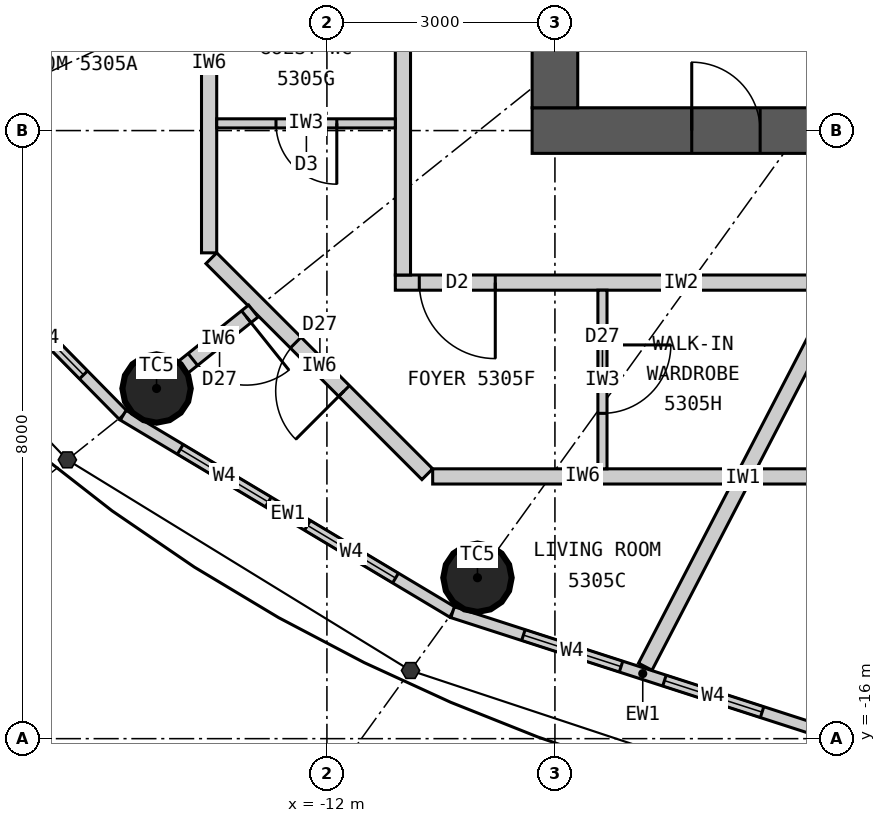
"""IFC4 building model, lengths in metres.
Left out: names, types, materials, properties, quantities, classifications, styles, units other than length and angle.
Written with IfcOpenShell. Run it as: python <this file> out.ifc"""

import sys

from ifc_helpers import new_model, si_unit, direction, frame, frame_2d, origin, origin_2d, place, context, subcontext, project, spatial, rectangle, circle, extrude, element, fill, save


model = new_model("IFC4")
c1 = context("Model", 3, precision=1e-05, world=origin(), true_north=direction((0.0, 1.0)))
c2 = subcontext(c1, "Body", "Model", "MODEL_VIEW")
j1 = project(units=[si_unit("LENGTHUNIT", "METRE"), si_unit("PLANEANGLEUNIT", "RADIAN")], contexts=[c1])
p1 = place(None, origin())
s1 = spatial("IfcSite", under=j1, at=p1, CompositionType="ELEMENT")
p2 = place(p1, origin())
s2 = spatial("IfcBuilding", under=s1, at=p2, CompositionType="ELEMENT")
p3 = place(p2, frame((0.0, 0.0, 199.5)))
s3 = spatial("IfcBuildingStorey", under=s2, at=p3, CompositionType="ELEMENT", Elevation=199.5)
for number, where, z_axis, x_axis in (
    (1, (-14.241, -11.393, 0.0), (0.0, 0.0, 1.0), (1.0, 0.0, 0.0)),
    (2, (-10.019, -13.883, 0.0), (0.0, 0.0, 1.0), (1.0, 0.0, 0.0)),
):
    element("IfcColumn", number, at=place(p3, frame(where, z_axis=z_axis, x_axis=x_axis)), inside=s3, PredefinedType="COLUMN", context=c2, shape_type="SweptSolid", body=[
        extrude(circle(Radius=0.45, at=origin_2d()), origin(), (0.0, 0.0, 1.0), 3.3),
    ])
p4 = place(p3, frame((9.3, -8.0, 0.0), z_axis=(0.0, 0.0, 1.0), x_axis=(-1.0, 0.0, 0.0)))
e3 = element("IfcWall", 3, at=p4, inside=s3, PredefinedType="SHEAR", context=c2, shape_type="SweptSolid", body=[
    extrude(rectangle(XDim=18.6, YDim=0.6, at=frame_2d((9.3, 0.0))), origin(), (0.0, 0.0, 1.0), 3.3),
])
p5 = place(p4, frame((8.0, 0.0, 0.0)))
e4 = element("IfcOpeningElement", 4, at=p5, cuts=e3, PredefinedType="OPENING", context=c2, shape_type="SweptSolid", body=[
    extrude(rectangle(XDim=1.2, YDim=2.2, at=frame_2d((0.6, 1.1))), frame((0.0, 0.31, 0.0), z_axis=(0.0, -1.0, 0.0), x_axis=(1.0, 0.0, 0.0)), (0.0, 0.0, 1.0), 0.62),
])
p6 = place(p4, frame((15.6, 0.0, 0.0)))
e5 = element("IfcOpeningElement", 5, at=p6, cuts=e3, PredefinedType="OPENING", context=c2, shape_type="SweptSolid", body=[
    extrude(rectangle(XDim=0.9, YDim=2.2, at=frame_2d((0.45, 1.1))), frame((0.0, 0.31, 0.0), z_axis=(0.0, -1.0, 0.0), x_axis=(1.0, 0.0, 0.0)), (0.0, 0.0, 1.0), 0.62),
])
p7 = place(p3, frame((-9.0, 7.7, 0.0), z_axis=(0.0, 0.0, 1.0), x_axis=(0.0, -1.0, 0.0)))
e6 = element("IfcWall", 6, at=p7, inside=s3, PredefinedType="SHEAR", context=c2, shape_type="SweptSolid", body=[
    extrude(rectangle(XDim=15.4, YDim=0.6, at=frame_2d((7.7, 0.0))), origin(), (0.0, 0.0, 1.0), 3.3),
])
p8 = place(p7, frame((6.8, 0.0, 0.0)))
e7 = element("IfcOpeningElement", 7, at=p8, cuts=e6, PredefinedType="OPENING", context=c2, shape_type="SweptSolid", body=[
    extrude(rectangle(XDim=1.8, YDim=2.2, at=frame_2d((0.9, 1.1))), frame((0.0, 0.31, 0.0), z_axis=(0.0, -1.0, 0.0), x_axis=(1.0, 0.0, 0.0)), (0.0, 0.0, 1.0), 0.62),
])
p9 = place(p3, frame((-18.04, -8.332, 0.0), z_axis=(0.0, 0.0, 1.0), x_axis=(0.701527379618, -0.712642501993, 0.0)))
e8 = element("IfcWall", 8, at=p9, inside=s3, PredefinedType="ELEMENTEDWALL", context=c2, shape_type="SweptSolid", body=[
    extrude(rectangle(XDim=4.788, YDim=0.15, at=frame_2d((2.394, 0.0))), origin(), (0.0, 0.0, 1.0), 3.12),
])
p10 = place(p9, frame((0.744, 0.0, 0.9)))
e9 = element("IfcOpeningElement", 9, at=p10, cuts=e8, PredefinedType="OPENING", context=c2, shape_type="SweptSolid", body=[
    extrude(rectangle(XDim=1.35, YDim=1.9, at=frame_2d((0.675, 0.95))), frame((0.0, 0.085, 0.0), z_axis=(0.0, -1.0, 0.0), x_axis=(1.0, 0.0, 0.0)), (0.0, 0.0, 1.0), 0.17),
])
p11 = place(p9, frame((2.694, 0.0, 0.9)))
e10 = element("IfcOpeningElement", 10, at=p11, cuts=e8, PredefinedType="OPENING", context=c2, shape_type="SweptSolid", body=[
    extrude(rectangle(XDim=1.35, YDim=1.9, at=frame_2d((0.675, 0.95))), frame((0.0, 0.085, 0.0), z_axis=(0.0, -1.0, 0.0), x_axis=(1.0, 0.0, 0.0)), (0.0, 0.0, 1.0), 0.17),
])
p12 = place(p3, frame((-14.68, -11.744, 0.0), z_axis=(0.0, 0.0, 1.0), x_axis=(0.85822150553, -0.513279502265, 0.0)))
e11 = element("IfcWall", 11, at=p12, inside=s3, PredefinedType="ELEMENTEDWALL", context=c2, shape_type="SweptSolid", body=[
    extrude(rectangle(XDim=5.05, YDim=0.15, at=frame_2d((2.525, 0.0))), origin(), (0.0, 0.0, 1.0), 3.12),
])
p13 = place(p12, frame((0.875, 0.0, 0.9)))
e12 = element("IfcOpeningElement", 12, at=p13, cuts=e11, PredefinedType="OPENING", context=c2, shape_type="SweptSolid", body=[
    extrude(rectangle(XDim=1.35, YDim=1.9, at=frame_2d((0.675, 0.95))), frame((0.0, 0.085, 0.0), z_axis=(0.0, -1.0, 0.0), x_axis=(1.0, 0.0, 0.0)), (0.0, 0.0, 1.0), 0.17),
])
p14 = place(p12, frame((2.825, 0.0, 0.9)))
e13 = element("IfcOpeningElement", 13, at=p14, cuts=e11, PredefinedType="OPENING", context=c2, shape_type="SweptSolid", body=[
    extrude(rectangle(XDim=1.35, YDim=1.9, at=frame_2d((0.675, 0.95))), frame((0.0, 0.085, 0.0), z_axis=(0.0, -1.0, 0.0), x_axis=(1.0, 0.0, 0.0)), (0.0, 0.0, 1.0), 0.17),
])
p15 = place(p3, frame((-10.346, -14.336, 0.0), z_axis=(0.0, 0.0, 1.0), x_axis=(0.951644702515, -0.307200846638, 0.0)))
e14 = element("IfcWall", 14, at=p15, inside=s3, PredefinedType="ELEMENTEDWALL", context=c2, shape_type="SweptSolid", body=[
    extrude(rectangle(XDim=5.258, YDim=0.15, at=frame_2d((2.629, 0.0))), origin(), (0.0, 0.0, 1.0), 3.12),
])
p16 = place(p15, frame((0.979, 0.0, 0.9)))
e15 = element("IfcOpeningElement", 15, at=p16, cuts=e14, PredefinedType="OPENING", context=c2, shape_type="SweptSolid", body=[
    extrude(rectangle(XDim=1.35, YDim=1.9, at=frame_2d((0.675, 0.95))), frame((0.0, 0.085, 0.0), z_axis=(0.0, -1.0, 0.0), x_axis=(1.0, 0.0, 0.0)), (0.0, 0.0, 1.0), 0.17),
])
p17 = place(p15, frame((2.929, 0.0, 0.9)))
e16 = element("IfcOpeningElement", 16, at=p17, cuts=e14, PredefinedType="OPENING", context=c2, shape_type="SweptSolid", body=[
    extrude(rectangle(XDim=1.35, YDim=1.9, at=frame_2d((0.675, 0.95))), frame((0.0, 0.085, 0.0), z_axis=(0.0, -1.0, 0.0), x_axis=(1.0, 0.0, 0.0)), (0.0, 0.0, 1.0), 0.17),
])
p18 = place(p3, frame((-3.579, -10.0, 0.0), z_axis=(0.0, 0.0, 1.0), x_axis=(-1.0, 0.0, 0.0)))
e17 = element("IfcWall", 17, at=p18, inside=s3, PredefinedType="PARTITIONING", context=c2, shape_type="SweptSolid", body=[
    extrude(rectangle(XDim=7.521, YDim=0.2, at=frame_2d((3.761, 0.0))), origin(), (0.0, 0.0, 1.0), 3.12),
])
p19 = place(p18, frame((6.206, 0.0, 0.0)))
e18 = element("IfcOpeningElement", 18, at=p19, cuts=e17, PredefinedType="OPENING", context=c2, shape_type="SweptSolid", body=[
    extrude(rectangle(XDim=1.0, YDim=2.2, at=frame_2d((0.5, 1.1))), frame((0.0, 0.11, 0.0), z_axis=(0.0, -1.0, 0.0), x_axis=(1.0, 0.0, 0.0)), (0.0, 0.0, 1.0), 0.22),
])
p20 = place(p3, frame((-11.0, 0.464, 0.0), z_axis=(0.0, 0.0, 1.0), x_axis=(0.0, -1.0, 0.0)))
e19 = element("IfcWall", 19, at=p20, inside=s3, PredefinedType="PARTITIONING", context=c2, shape_type="SweptSolid", body=[
    extrude(rectangle(XDim=10.364, YDim=0.2, at=frame_2d((5.182, 0.0))), origin(), (0.0, 0.0, 1.0), 3.12),
])
p21 = place(p3, frame((-5.241, -10.1, 0.0), z_axis=(0.0, 0.0, 1.0), x_axis=(-0.460603196597, -0.887606160008, 0.0)))
e20 = element("IfcWall", 20, at=p21, inside=s3, PredefinedType="PARTITIONING", context=c2, shape_type="SweptSolid", body=[
    extrude(rectangle(XDim=5.58, YDim=0.2, at=frame_2d((2.79, 0.0))), origin(), (0.0, 0.0, 1.0), 3.12),
])
p22 = place(p3, frame((-13.55, -4.6, 0.0), z_axis=(0.0, 0.0, 1.0), x_axis=(0.0, -1.0, 0.0)))
e21 = element("IfcWall", 21, at=p22, inside=s3, PredefinedType="PARTITIONING", context=c2, shape_type="SweptSolid", body=[
    extrude(rectangle(XDim=5.009, YDim=0.2, at=frame_2d((2.504, 0.0))), origin(), (0.0, 0.0, 1.0), 3.12),
])
p23 = place(p22, frame((0.774, 0.0, 0.0)))
e22 = element("IfcOpeningElement", 22, at=p23, cuts=e21, PredefinedType="OPENING", context=c2, shape_type="SweptSolid", body=[
    extrude(rectangle(XDim=0.8, YDim=2.1, at=frame_2d((0.4, 1.05))), frame((0.0, 0.11, 0.0), z_axis=(0.0, -1.0, 0.0), x_axis=(1.0, 0.0, 0.0)), (0.0, 0.0, 1.0), 0.22),
])
p24 = place(p3, frame((-13.521, -9.679, 0.0), z_axis=(0.0, 0.0, 1.0), x_axis=(0.707106781187, -0.707106781187, 0.0)))
e23 = element("IfcWall", 23, at=p24, inside=s3, PredefinedType="PARTITIONING", context=c2, shape_type="SweptSolid", body=[
    extrude(rectangle(XDim=4.019, YDim=0.2, at=frame_2d((2.009, 0.0))), origin(), (0.0, 0.0, 1.0), 3.12),
])
p25 = place(p24, frame((1.57, 0.0, 0.0)))
e24 = element("IfcOpeningElement", 24, at=p25, cuts=e23, PredefinedType="OPENING", context=c2, shape_type="SweptSolid", body=[
    extrude(rectangle(XDim=0.9, YDim=2.1, at=frame_2d((0.45, 1.05))), frame((0.0, 0.11, 0.0), z_axis=(0.0, -1.0, 0.0), x_axis=(1.0, 0.0, 0.0)), (0.0, 0.0, 1.0), 0.22),
])
p26 = place(p3, frame((-10.609, -12.55, 0.0), z_axis=(0.0, 0.0, 1.0), x_axis=(1.0, 0.0, 0.0)))
e25 = element("IfcWall", 25, at=p26, inside=s3, PredefinedType="PARTITIONING", context=c2, shape_type="SweptSolid", body=[
    extrude(rectangle(XDim=3.947, YDim=0.2, at=frame_2d((1.974, 0.0))), origin(), (0.0, 0.0, 1.0), 3.12),
])
p27 = place(p3, frame((-12.968, -10.374, 0.0), z_axis=(0.0, 0.0, 1.0), x_axis=(-0.780888968944, -0.624669847345, 0.0)))
e26 = element("IfcWall", 26, at=p27, inside=s3, PredefinedType="PARTITIONING", context=c2, shape_type="SweptSolid", body=[
    extrude(rectangle(XDim=1.181, YDim=0.2, at=frame_2d((0.591, 0.0))), origin(), (0.0, 0.0, 1.0), 2.42),
])
p28 = place(p27, frame((0.12, 0.0, 0.0)))
e27 = element("IfcOpeningElement", 27, at=p28, cuts=e26, PredefinedType="OPENING", context=c2, shape_type="SweptSolid", body=[
    extrude(rectangle(XDim=0.9, YDim=2.1, at=frame_2d((0.45, 1.05))), frame((0.0, 0.11, 0.0), z_axis=(0.0, -1.0, 0.0), x_axis=(1.0, 0.0, 0.0)), (0.0, 0.0, 1.0), 0.22),
])
p29 = place(p3, frame((-11.1, -7.905, 0.0), z_axis=(0.0, 0.0, 1.0), x_axis=(-1.0, 0.0, 0.0)))
e28 = element("IfcWall", 28, at=p29, inside=s3, PredefinedType="PARTITIONING", context=c2, shape_type="SweptSolid", body=[
    extrude(rectangle(XDim=2.35, YDim=0.12, at=frame_2d((1.175, 0.0))), origin(), (0.0, 0.0, 1.0), 3.12),
])
p30 = place(p29, frame((0.77, 0.0, 0.0)))
e29 = element("IfcOpeningElement", 29, at=p30, cuts=e28, PredefinedType="OPENING", context=c2, shape_type="SweptSolid", body=[
    extrude(rectangle(XDim=0.8, YDim=2.1, at=frame_2d((0.4, 1.05))), frame((0.0, 0.07, 0.0), z_axis=(0.0, -1.0, 0.0), x_axis=(1.0, 0.0, 0.0)), (0.0, 0.0, 1.0), 0.14),
])
p31 = place(p3, frame((-8.375, -10.1, 0.0), z_axis=(0.0, 0.0, 1.0), x_axis=(0.0, -1.0, 0.0)))
e30 = element("IfcWall", 30, at=p31, inside=s3, PredefinedType="PARTITIONING", context=c2, shape_type="SweptSolid", body=[
    extrude(rectangle(XDim=2.35, YDim=0.12, at=frame_2d((1.175, 0.0))), origin(), (0.0, 0.0, 1.0), 3.12),
])
p32 = place(p31, frame((0.72, 0.0, 0.0)))
e31 = element("IfcOpeningElement", 31, at=p32, cuts=e30, PredefinedType="OPENING", context=c2, shape_type="SweptSolid", body=[
    extrude(rectangle(XDim=0.9, YDim=2.1, at=frame_2d((0.45, 1.05))), frame((0.0, 0.07, 0.0), z_axis=(0.0, -1.0, 0.0), x_axis=(1.0, 0.0, 0.0)), (0.0, 0.0, 1.0), 0.14),
])
p33 = place(p3, frame((-6.364, -12.55, 0.0), z_axis=(0.0, 0.0, 1.0), x_axis=(1.0, 0.0, 0.0)))
e32 = element("IfcWall", 32, at=p33, inside=s3, PredefinedType="PARTITIONING", context=c2, shape_type="SweptSolid", body=[
    extrude(rectangle(XDim=10.446, YDim=0.2, at=frame_2d((5.223, 0.0))), origin(), (0.0, 0.0, 1.0), 3.12),
])
p34 = place(p33, frame((7.202, 0.0, 0.0)))
e33 = element("IfcOpeningElement", 33, at=p34, cuts=e32, PredefinedType="OPENING", context=c2, shape_type="SweptSolid", body=[
    extrude(rectangle(XDim=0.8, YDim=2.1, at=frame_2d((0.4, 1.05))), frame((0.0, 0.11, 0.0), z_axis=(0.0, -1.0, 0.0), x_axis=(1.0, 0.0, 0.0)), (0.0, 0.0, 1.0), 0.22),
])
p35 = place(p33, frame((3.895, 0.0, 0.0)))
e34 = element("IfcOpeningElement", 34, at=p35, cuts=e32, PredefinedType="OPENING", context=c2, shape_type="SweptSolid", body=[
    extrude(rectangle(XDim=0.9, YDim=2.1, at=frame_2d((0.45, 1.05))), frame((0.0, 0.11, 0.0), z_axis=(0.0, -1.0, 0.0), x_axis=(1.0, 0.0, 0.0)), (0.0, 0.0, 1.0), 0.22),
])
p36 = place(p11, origin())
e35 = element("IfcWindow", 35, at=p36, inside=s3, PartitioningType="SINGLE_PANEL", PredefinedType="WINDOW", context=c2, shape_type="SweptSolid", body=[
    extrude(rectangle(XDim=1.35, YDim=1.9, at=frame_2d((0.675, 0.95))), frame((0.0, 0.03, 0.0), z_axis=(0.0, -1.0, 0.0), x_axis=(1.0, 0.0, 0.0)), (0.0, 0.0, 1.0), 0.06),
])
fill(e10, e35)
p37 = place(p13, origin())
e36 = element("IfcWindow", 36, at=p37, inside=s3, PartitioningType="SINGLE_PANEL", PredefinedType="WINDOW", context=c2, shape_type="SweptSolid", body=[
    extrude(rectangle(XDim=1.35, YDim=1.9, at=frame_2d((0.675, 0.95))), frame((0.0, 0.03, 0.0), z_axis=(0.0, -1.0, 0.0), x_axis=(1.0, 0.0, 0.0)), (0.0, 0.0, 1.0), 0.06),
])
fill(e12, e36)
p38 = place(p14, origin())
e37 = element("IfcWindow", 37, at=p38, inside=s3, PartitioningType="SINGLE_PANEL", PredefinedType="WINDOW", context=c2, shape_type="SweptSolid", body=[
    extrude(rectangle(XDim=1.35, YDim=1.9, at=frame_2d((0.675, 0.95))), frame((0.0, 0.03, 0.0), z_axis=(0.0, -1.0, 0.0), x_axis=(1.0, 0.0, 0.0)), (0.0, 0.0, 1.0), 0.06),
])
fill(e13, e37)
p39 = place(p16, origin())
e38 = element("IfcWindow", 38, at=p39, inside=s3, PartitioningType="SINGLE_PANEL", PredefinedType="WINDOW", context=c2, shape_type="SweptSolid", body=[
    extrude(rectangle(XDim=1.35, YDim=1.9, at=frame_2d((0.675, 0.95))), frame((0.0, 0.03, 0.0), z_axis=(0.0, -1.0, 0.0), x_axis=(1.0, 0.0, 0.0)), (0.0, 0.0, 1.0), 0.06),
])
fill(e15, e38)
p40 = place(p17, origin())
e39 = element("IfcWindow", 39, at=p40, inside=s3, PartitioningType="SINGLE_PANEL", PredefinedType="WINDOW", context=c2, shape_type="SweptSolid", body=[
    extrude(rectangle(XDim=1.35, YDim=1.9, at=frame_2d((0.675, 0.95))), frame((0.0, 0.03, 0.0), z_axis=(0.0, -1.0, 0.0), x_axis=(1.0, 0.0, 0.0)), (0.0, 0.0, 1.0), 0.06),
])
fill(e16, e39)
p41 = place(p19, origin())
e40 = element("IfcDoor", 40, at=p41, inside=s3, OperationType="SINGLE_SWING_LEFT", PredefinedType="DOOR", context=c2, shape_type="SweptSolid", body=[
    extrude(rectangle(XDim=1.0, YDim=2.2, at=frame_2d((0.5, 1.1))), frame((0.0, 0.025, 0.0), z_axis=(0.0, -1.0, 0.0), x_axis=(1.0, 0.0, 0.0)), (0.0, 0.0, 1.0), 0.05),
])
fill(e18, e40)
p42 = place(p30, origin())
e41 = element("IfcDoor", 41, at=p42, inside=s3, OperationType="SINGLE_SWING_LEFT", PredefinedType="DOOR", context=c2, shape_type="SweptSolid", body=[
    extrude(rectangle(XDim=0.8, YDim=2.1, at=frame_2d((0.4, 1.05))), frame((0.0, 0.025, 0.0), z_axis=(0.0, -1.0, 0.0), x_axis=(1.0, 0.0, 0.0)), (0.0, 0.0, 1.0), 0.05),
])
fill(e29, e41)
p43 = place(p32, origin())
e42 = element("IfcDoor", 42, at=p43, inside=s3, OperationType="SINGLE_SWING_LEFT", PredefinedType="DOOR", context=c2, shape_type="SweptSolid", body=[
    extrude(rectangle(XDim=0.9, YDim=2.1, at=frame_2d((0.45, 1.05))), frame((0.0, 0.025, 0.0), z_axis=(0.0, -1.0, 0.0), x_axis=(1.0, 0.0, 0.0)), (0.0, 0.0, 1.0), 0.05),
])
fill(e31, e42)
p44 = place(p25, origin())
e43 = element("IfcDoor", 43, at=p44, inside=s3, OperationType="SINGLE_SWING_RIGHT", PredefinedType="DOOR", context=c2, shape_type="SweptSolid", body=[
    extrude(rectangle(XDim=0.9, YDim=2.1, at=frame_2d((0.45, 1.05))), frame((0.0, 0.025, 0.0), z_axis=(0.0, -1.0, 0.0), x_axis=(1.0, 0.0, 0.0)), (0.0, 0.0, 1.0), 0.05),
])
fill(e24, e43)
p45 = place(p28, origin())
e44 = element("IfcDoor", 44, at=p45, inside=s3, OperationType="SINGLE_SWING_LEFT", PredefinedType="DOOR", context=c2, shape_type="SweptSolid", body=[
    extrude(rectangle(XDim=0.9, YDim=2.1, at=frame_2d((0.45, 1.05))), frame((0.0, 0.025, 0.0), z_axis=(0.0, -1.0, 0.0), x_axis=(1.0, 0.0, 0.0)), (0.0, 0.0, 1.0), 0.05),
])
fill(e27, e44)
p46 = place(p6, origin())
e45 = element("IfcDoor", 45, at=p46, inside=s3, OperationType="SINGLE_SWING_RIGHT", PredefinedType="DOOR", context=c2, shape_type="SweptSolid", body=[
    extrude(rectangle(XDim=0.9, YDim=2.2, at=frame_2d((0.45, 1.1))), frame((0.0, 0.025, 0.0), z_axis=(0.0, -1.0, 0.0), x_axis=(1.0, 0.0, 0.0)), (0.0, 0.0, 1.0), 0.05),
])
fill(e5, e45)
save(model, sys.argv[1])
